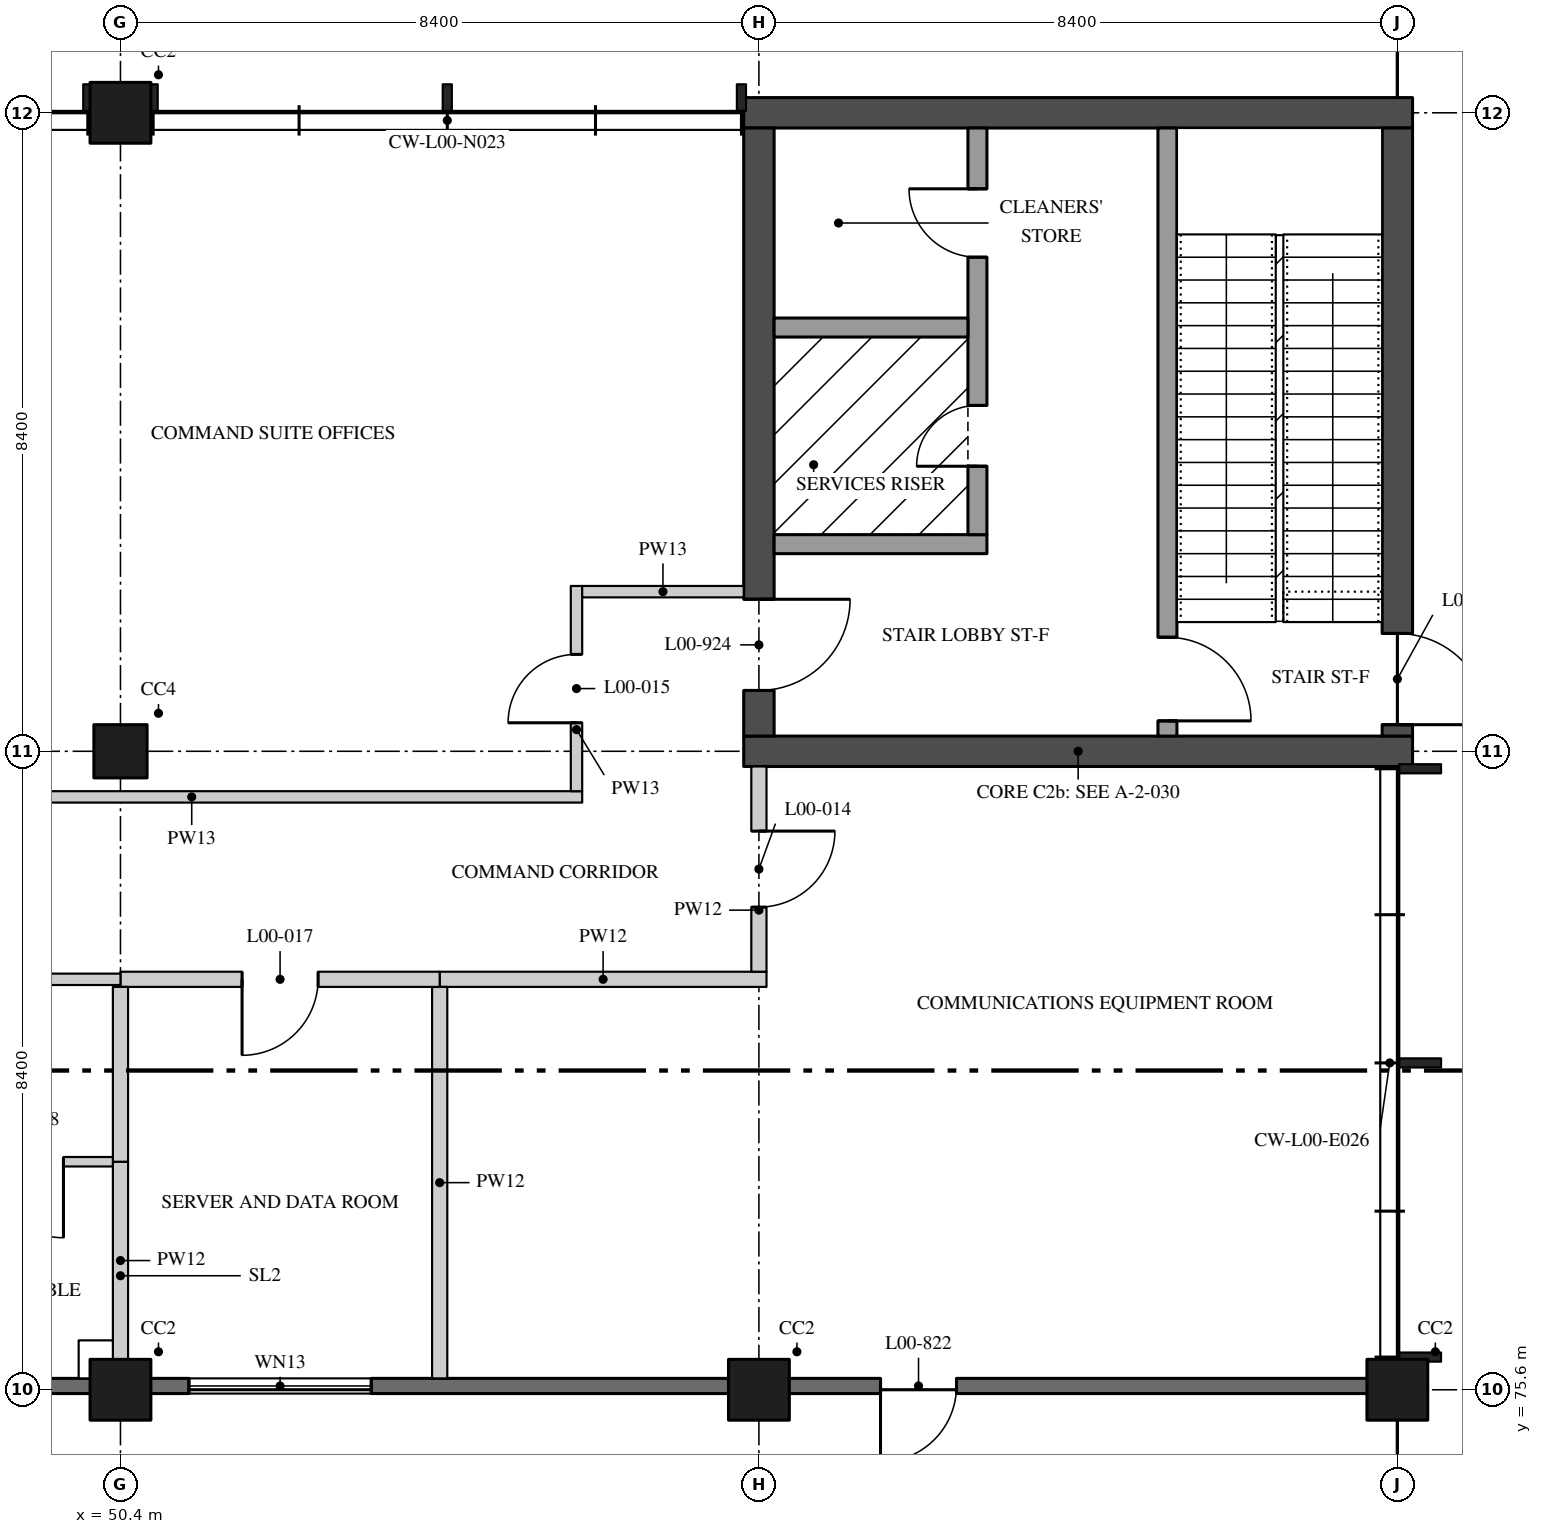
"""IFC4 building model, lengths in metres.
Left out: names, types, materials, properties, quantities, classifications, styles, units other than length and angle.
Written with IfcOpenShell. Run it as: python <this file> out.ifc"""

import sys

from ifc_helpers import new_model, si_unit, direction, frame, frame_2d, origin, origin_2d, place, context, subcontext, project, spatial, rectangle, extrude, element, fill, save


model = new_model("IFC4")
c1 = context("Model", 3, precision=1e-05, world=origin(), true_north=direction((0.0, 1.0)))
c2 = subcontext(c1, "Body", "Model", "MODEL_VIEW")
j1 = project(units=[si_unit("LENGTHUNIT", "METRE"), si_unit("PLANEANGLEUNIT", "RADIAN")], contexts=[c1])
p1 = place(None, origin())
s1 = spatial("IfcSite", under=j1, at=p1, CompositionType="ELEMENT")
p2 = place(p1, origin())
s2 = spatial("IfcBuilding", under=s1, at=p2, CompositionType="ELEMENT")
p3 = place(p2, origin())
s3 = spatial("IfcBuildingStorey", under=s2, at=p3, CompositionType="ELEMENT", Elevation=0.0)
p4 = place(p3, frame((50.4, 75.6, 0.0), z_axis=(0.0, 0.0, 1.0), x_axis=(1.0, 0.0, 0.0)))
e1 = element("IfcColumn", 1, at=p4, inside=s3, PredefinedType="COLUMN", context=c2, shape_type="SweptSolid", body=[
    extrude(rectangle(XDim=0.8, YDim=0.8, at=origin_2d()), origin(), (0.0, 0.0, 1.0), 5.05),
])
p5 = place(p3, frame((50.4, 84.0, 0.0), z_axis=(0.0, 0.0, 1.0), x_axis=(1.0, 0.0, 0.0)))
e2 = element("IfcColumn", 2, at=p5, inside=s3, PredefinedType="COLUMN", context=c2, shape_type="SweptSolid", body=[
    extrude(rectangle(XDim=0.7, YDim=0.7, at=origin_2d()), origin(), (0.0, 0.0, 1.0), 5.05),
])
for number, where, z_axis, x_axis in (
    (3, (50.4, 92.4, 0.0), (0.0, 0.0, 1.0), (1.0, 0.0, 0.0)),
    (4, (58.8, 75.6, 0.0), (0.0, 0.0, 1.0), (1.0, 0.0, 0.0)),
    (5, (67.2, 75.6, 0.0), (0.0, 0.0, 1.0), (1.0, 0.0, 0.0)),
):
    element("IfcColumn", number, at=place(p3, frame(where, z_axis=z_axis, x_axis=x_axis)), inside=s3, PredefinedType="COLUMN", context=c2, shape_type="SweptSolid", body=[
        extrude(rectangle(XDim=0.8, YDim=0.8, at=origin_2d()), origin(), (0.0, 0.0, 1.0), 5.05),
    ])
for number, where, z_axis, x_axis in (
    (6, (58.6, 84.0, 0.0), (0.0, 0.0, 1.0), (1.0, 0.0, 0.0)),
    (7, (58.6, 92.4, 0.0), (0.0, 0.0, 1.0), (1.0, 0.0, 0.0)),
):
    element("IfcWall", number, at=place(p3, frame(where, z_axis=z_axis, x_axis=x_axis)), inside=s3, PredefinedType="SHEAR", context=c2, shape_type="SweptSolid", body=[
        extrude(rectangle(XDim=8.8, YDim=0.4, at=frame_2d((4.4, 0.0))), origin(), (0.0, 0.0, 1.0), 5.05),
    ])
p6 = place(p3, frame((58.8, 84.2, 0.0), z_axis=(0.0, 0.0, 1.0), x_axis=(0.0, 1.0, 0.0)))
e8 = element("IfcWall", 8, at=p6, inside=s3, PredefinedType="SHEAR", context=c2, shape_type="SweptSolid", body=[
    extrude(rectangle(XDim=8.0, YDim=0.4, at=frame_2d((4.0, 0.0))), origin(), (0.0, 0.0, 1.0), 5.05),
])
p7 = place(p6, frame((0.6, 0.0, 0.0)))
e9 = element("IfcOpeningElement", 9, at=p7, cuts=e8, PredefinedType="OPENING", context=c2, shape_type="SweptSolid", body=[
    extrude(rectangle(XDim=1.2, YDim=2.1, at=frame_2d((0.6, 1.05))), frame((0.0, 0.21, 0.0), z_axis=(0.0, -1.0, 0.0), x_axis=(1.0, 0.0, 0.0)), (0.0, 0.0, 1.0), 0.42),
])
p8 = place(p3, frame((67.2, 84.2, 0.0), z_axis=(0.0, 0.0, 1.0), x_axis=(0.0, 1.0, 0.0)))
e10 = element("IfcWall", 10, at=p8, inside=s3, PredefinedType="SHEAR", context=c2, shape_type="SweptSolid", body=[
    extrude(rectangle(XDim=8.0, YDim=0.4, at=frame_2d((4.0, 0.0))), origin(), (0.0, 0.0, 1.0), 5.05),
])
p9 = place(p8, frame((0.15, 0.0, 0.0)))
e11 = element("IfcOpeningElement", 11, at=p9, cuts=e10, PredefinedType="OPENING", context=c2, shape_type="SweptSolid", body=[
    extrude(rectangle(XDim=1.2, YDim=2.1, at=frame_2d((0.6, 1.05))), frame((0.0, 0.21, 0.0), z_axis=(0.0, -1.0, 0.0), x_axis=(1.0, 0.0, 0.0)), (0.0, 0.0, 1.0), 0.42),
])
p10 = place(p3, frame((64.175, 84.2, 0.0), z_axis=(0.0, 0.0, 1.0), x_axis=(0.0, 1.0, 0.0)))
e12 = element("IfcWall", 12, at=p10, inside=s3, PredefinedType="SOLIDWALL", context=c2, shape_type="SweptSolid", body=[
    extrude(rectangle(XDim=8.0, YDim=0.25, at=frame_2d((4.0, 0.0))), origin(), (0.0, 0.0, 1.0), 5.05),
])
p11 = place(p10, frame((0.2, 0.0, 0.0)))
e13 = element("IfcOpeningElement", 13, at=p11, cuts=e12, PredefinedType="OPENING", context=c2, shape_type="SweptSolid", body=[
    extrude(rectangle(XDim=1.1, YDim=2.1, at=frame_2d((0.55, 1.05))), frame((0.0, 0.135, 0.0), z_axis=(0.0, -1.0, 0.0), x_axis=(1.0, 0.0, 0.0)), (0.0, 0.0, 1.0), 0.27),
])
p12 = place(p3, frame((61.8, 86.725, 0.0), z_axis=(0.0, 0.0, 1.0), x_axis=(-1.0, 0.0, 0.0)))
e14 = element("IfcWall", 14, at=p12, inside=s3, PredefinedType="SOLIDWALL", context=c2, shape_type="SweptSolid", body=[
    extrude(rectangle(XDim=2.8, YDim=0.25, at=frame_2d((1.4, 0.0))), origin(), (0.0, 0.0, 1.0), 5.05),
])
p13 = place(p3, frame((61.675, 86.85, 0.0), z_axis=(0.0, 0.0, 1.0), x_axis=(0.0, 1.0, 0.0)))
e15 = element("IfcWall", 15, at=p13, inside=s3, PredefinedType="SOLIDWALL", context=c2, shape_type="SweptSolid", body=[
    extrude(rectangle(XDim=5.35, YDim=0.25, at=frame_2d((2.675, 0.0))), origin(), (0.0, 0.0, 1.0), 5.05),
])
p14 = place(p13, frame((3.65, 0.0, 0.0)))
e16 = element("IfcOpeningElement", 16, at=p14, cuts=e15, PredefinedType="OPENING", context=c2, shape_type="SweptSolid", body=[
    extrude(rectangle(XDim=0.9, YDim=2.1, at=frame_2d((0.45, 1.05))), frame((0.0, 0.135, 0.0), z_axis=(0.0, -1.0, 0.0), x_axis=(1.0, 0.0, 0.0)), (0.0, 0.0, 1.0), 0.27),
])
p15 = place(p13, frame((0.9, 0.0, 0.0)))
e17 = element("IfcOpeningElement", 17, at=p15, cuts=e15, PredefinedType="OPENING", context=c2, shape_type="SweptSolid", body=[
    extrude(rectangle(XDim=0.8, YDim=2.1, at=frame_2d((0.4, 1.05))), frame((0.0, 0.135, 0.0), z_axis=(0.0, -1.0, 0.0), x_axis=(1.0, 0.0, 0.0)), (0.0, 0.0, 1.0), 0.27),
])
p16 = place(p3, frame((61.55, 89.575, 0.0), z_axis=(0.0, 0.0, 1.0), x_axis=(-1.0, 0.0, 0.0)))
e18 = element("IfcWall", 18, at=p16, inside=s3, PredefinedType="SOLIDWALL", context=c2, shape_type="SweptSolid", body=[
    extrude(rectangle(XDim=2.55, YDim=0.25, at=frame_2d((1.275, 0.0))), origin(), (0.0, 0.0, 1.0), 5.05),
])
p17 = place(p3, frame((54.6, 81.0, 0.0), z_axis=(0.0, 0.0, 1.0), x_axis=(1.0, 0.0, 0.0)))
e19 = element("IfcWall", 19, at=p17, inside=s3, PredefinedType="PARTITIONING", context=c2, shape_type="SweptSolid", body=[
    extrude(rectangle(XDim=4.3, YDim=0.2, at=frame_2d((2.15, 0.0))), origin(), (0.0, 0.0, 1.0), 5.05),
])
p18 = place(p3, frame((58.8, 81.1, 0.0), z_axis=(0.0, 0.0, 1.0), x_axis=(0.0, 1.0, 0.0)))
e20 = element("IfcWall", 20, at=p18, inside=s3, PredefinedType="PARTITIONING", context=c2, shape_type="SweptSolid", body=[
    extrude(rectangle(XDim=2.7, YDim=0.2, at=frame_2d((1.35, 0.0))), origin(), (0.0, 0.0, 1.0), 5.05),
])
p19 = place(p18, frame((0.85, 0.0, 0.0)))
e21 = element("IfcOpeningElement", 21, at=p19, cuts=e20, PredefinedType="OPENING", context=c2, shape_type="SweptSolid", body=[
    extrude(rectangle(XDim=1.0, YDim=2.1, at=frame_2d((0.5, 1.05))), frame((0.0, 0.11, 0.0), z_axis=(0.0, -1.0, 0.0), x_axis=(1.0, 0.0, 0.0)), (0.0, 0.0, 1.0), 0.22),
])
p20 = place(p3, frame((54.6, 75.75, 0.0), z_axis=(0.0, 0.0, 1.0), x_axis=(0.0, 1.0, 0.0)))
e22 = element("IfcWall", 22, at=p20, inside=s3, PredefinedType="PARTITIONING", context=c2, shape_type="SweptSolid", body=[
    extrude(rectangle(XDim=5.15, YDim=0.2, at=frame_2d((2.575, 0.0))), origin(), (0.0, 0.0, 1.0), 5.05),
])
p21 = place(p3, frame((46.2, 83.4, 0.0), z_axis=(0.0, 0.0, 1.0), x_axis=(1.0, 0.0, 0.0)))
e23 = element("IfcWall", 23, at=p21, inside=s3, PredefinedType="PARTITIONING", context=c2, shape_type="SweptSolid", body=[
    extrude(rectangle(XDim=10.275, YDim=0.15, at=frame_2d((5.138, 0.0))), origin(), (0.0, 0.0, 1.0), 5.05),
])
p22 = place(p3, frame((56.4, 83.475, 0.0), z_axis=(0.0, 0.0, 1.0), x_axis=(0.0, 1.0, 0.0)))
e24 = element("IfcWall", 24, at=p22, inside=s3, PredefinedType="PARTITIONING", context=c2, shape_type="SweptSolid", body=[
    extrude(rectangle(XDim=2.7, YDim=0.15, at=frame_2d((1.35, 0.0))), origin(), (0.0, 0.0, 1.0), 5.05),
])
p23 = place(p22, frame((0.9, 0.0, 0.0)))
e25 = element("IfcOpeningElement", 25, at=p23, cuts=e24, PredefinedType="OPENING", context=c2, shape_type="SweptSolid", body=[
    extrude(rectangle(XDim=0.9, YDim=2.1, at=frame_2d((0.45, 1.05))), frame((0.0, 0.085, 0.0), z_axis=(0.0, -1.0, 0.0), x_axis=(1.0, 0.0, 0.0)), (0.0, 0.0, 1.0), 0.17),
])
p24 = place(p3, frame((56.475, 86.1, 0.0), z_axis=(0.0, 0.0, 1.0), x_axis=(1.0, 0.0, 0.0)))
e26 = element("IfcWall", 26, at=p24, inside=s3, PredefinedType="PARTITIONING", context=c2, shape_type="SweptSolid", body=[
    extrude(rectangle(XDim=2.125, YDim=0.15, at=frame_2d((1.062, 0.0))), origin(), (0.0, 0.0, 1.0), 5.05),
])
p25 = place(p3, frame((50.4, 81.0, 0.0), z_axis=(0.0, 0.0, 1.0), x_axis=(1.0, 0.0, 0.0)))
e27 = element("IfcWall", 27, at=p25, inside=s3, PredefinedType="PARTITIONING", context=c2, shape_type="SweptSolid", body=[
    extrude(rectangle(XDim=4.2, YDim=0.2, at=frame_2d((2.1, 0.0))), origin(), (0.0, 0.0, 1.0), 5.05),
])
p26 = place(p25, frame((1.6, 0.0, 0.0)))
e28 = element("IfcOpeningElement", 28, at=p26, cuts=e27, PredefinedType="OPENING", context=c2, shape_type="SweptSolid", body=[
    extrude(rectangle(XDim=1.0, YDim=2.1, at=frame_2d((0.5, 1.05))), frame((0.0, 0.11, 0.0), z_axis=(0.0, -1.0, 0.0), x_axis=(1.0, 0.0, 0.0)), (0.0, 0.0, 1.0), 0.22),
])
p27 = place(p3, frame((42.2, 81.0, 0.0), z_axis=(0.0, 0.0, 1.0), x_axis=(1.0, 0.0, 0.0)))
e29 = element("IfcWall", 29, at=p27, inside=s3, PredefinedType="PARTITIONING", context=c2, shape_type="SweptSolid", body=[
    extrude(rectangle(XDim=8.2, YDim=0.15, at=frame_2d((4.1, 0.0))), origin(), (0.0, 0.0, 1.0), 5.05),
])
p28 = place(p27, frame((2.35, 0.0, 0.0)))
e30 = element("IfcOpeningElement", 30, at=p28, cuts=e29, PredefinedType="OPENING", context=c2, shape_type="SweptSolid", body=[
    extrude(rectangle(XDim=0.9, YDim=2.1, at=frame_2d((0.45, 1.05))), frame((0.0, 0.085, 0.0), z_axis=(0.0, -1.0, 0.0), x_axis=(1.0, 0.0, 0.0)), (0.0, 0.0, 1.0), 0.17),
])
p29 = place(p3, frame((50.4, 76.0, 0.0), z_axis=(0.0, 0.0, 1.0), x_axis=(0.0, 1.0, 0.0)))
e31 = element("IfcWall", 31, at=p29, inside=s3, PredefinedType="PARTITIONING", context=c2, shape_type="SweptSolid", body=[
    extrude(rectangle(XDim=2.6, YDim=0.2, at=frame_2d((1.3, 0.0))), origin(), (0.0, 0.0, 1.0), 5.05),
])
p30 = place(p3, frame((50.4, 78.6, 0.0), z_axis=(0.0, 0.0, 1.0), x_axis=(0.0, 1.0, 0.0)))
e32 = element("IfcWall", 32, at=p30, inside=s3, PredefinedType="PARTITIONING", context=c2, shape_type="SweptSolid", body=[
    extrude(rectangle(XDim=2.3, YDim=0.2, at=frame_2d((1.15, 0.0))), origin(), (0.0, 0.0, 1.0), 5.05),
])
p31 = place(p3, frame((48.0, 78.6, 0.0), z_axis=(0.0, 0.0, 1.0), x_axis=(1.0, 0.0, 0.0)))
e33 = element("IfcWall", 33, at=p31, inside=s3, PredefinedType="PARTITIONING", context=c2, shape_type="SweptSolid", body=[
    extrude(rectangle(XDim=2.3, YDim=0.125, at=frame_2d((1.15, 0.0))), origin(), (0.0, 0.0, 1.0), 5.05),
])
p32 = place(p31, frame((0.65, 0.0, 0.0)))
e34 = element("IfcOpeningElement", 34, at=p32, cuts=e33, PredefinedType="OPENING", context=c2, shape_type="SweptSolid", body=[
    extrude(rectangle(XDim=1.0, YDim=2.1, at=frame_2d((0.5, 1.05))), frame((0.0, 0.073, 0.0), z_axis=(0.0, -1.0, 0.0), x_axis=(1.0, 0.0, 0.0)), (0.0, 0.0, 1.0), 0.145),
])
p33 = place(p3, frame((42.2, 75.65, 0.0), z_axis=(0.0, 0.0, 1.0), x_axis=(1.0, 0.0, 0.0)))
e35 = element("IfcWall", 35, at=p33, inside=s3, PredefinedType="SOLIDWALL", context=c2, shape_type="SweptSolid", body=[
    extrude(rectangle(XDim=7.82, YDim=0.2, at=frame_2d((3.91, 0.0))), origin(), (0.0, 0.0, 1.0), 5.05),
])
p34 = place(p3, frame((50.78, 75.65, 0.0), z_axis=(0.0, 0.0, 1.0), x_axis=(1.0, 0.0, 0.0)))
e36 = element("IfcWall", 36, at=p34, inside=s3, PredefinedType="SOLIDWALL", context=c2, shape_type="SweptSolid", body=[
    extrude(rectangle(XDim=7.64, YDim=0.2, at=frame_2d((3.82, 0.0))), origin(), (0.0, 0.0, 1.0), 5.05),
])
p35 = place(p34, frame((0.52, 0.0, 0.9)))
e37 = element("IfcOpeningElement", 37, at=p35, cuts=e36, PredefinedType="OPENING", context=c2, shape_type="SweptSolid", body=[
    extrude(rectangle(XDim=2.4, YDim=2.85, at=frame_2d((1.2, 1.425))), frame((0.0, 0.11, 0.0), z_axis=(0.0, -1.0, 0.0), x_axis=(1.0, 0.0, 0.0)), (0.0, 0.0, 1.0), 0.22),
])
p36 = place(p3, frame((59.18, 75.65, 0.0), z_axis=(0.0, 0.0, 1.0), x_axis=(1.0, 0.0, 0.0)))
e38 = element("IfcWall", 38, at=p36, inside=s3, PredefinedType="SOLIDWALL", context=c2, shape_type="SweptSolid", body=[
    extrude(rectangle(XDim=7.64, YDim=0.2, at=frame_2d((3.82, 0.0))), origin(), (0.0, 0.0, 1.0), 5.05),
])
p37 = place(p36, frame((1.22, 0.0, 0.0)))
e39 = element("IfcOpeningElement", 39, at=p37, cuts=e38, PredefinedType="OPENING", context=c2, shape_type="SweptSolid", body=[
    extrude(rectangle(XDim=1.0, YDim=2.4, at=frame_2d((0.5, 1.2))), frame((0.0, 0.11, 0.0), z_axis=(0.0, -1.0, 0.0), x_axis=(1.0, 0.0, 0.0)), (0.0, 0.0, 1.0), 0.22),
])
p38 = place(p14, origin())
e40 = element("IfcDoor", 40, at=p38, inside=s3, OperationType="SINGLE_SWING_LEFT", PredefinedType="DOOR", context=c2, shape_type="SweptSolid", body=[
    extrude(rectangle(XDim=0.9, YDim=2.1, at=frame_2d((0.45, 1.05))), frame((0.0, 0.035, 0.0), z_axis=(0.0, -1.0, 0.0), x_axis=(1.0, 0.0, 0.0)), (0.0, 0.0, 1.0), 0.07),
])
fill(e16, e40)
p39 = place(p7, frame((1.2, 0.0, 0.0), z_axis=(0.0, 0.0, 1.0), x_axis=(-1.0, 0.0, 0.0)))
e41 = element("IfcDoor", 41, at=p39, inside=s3, OperationType="SINGLE_SWING_RIGHT", PredefinedType="DOOR", context=c2, shape_type="SweptSolid", body=[
    extrude(rectangle(XDim=1.2, YDim=2.1, at=frame_2d((0.6, 1.05))), frame((0.0, 0.035, 0.0), z_axis=(0.0, -1.0, 0.0), x_axis=(1.0, 0.0, 0.0)), (0.0, 0.0, 1.0), 0.07),
])
fill(e9, e41)
p40 = place(p15, origin())
e42 = element("IfcDoor", 42, at=p40, inside=s3, OperationType="SINGLE_SWING_RIGHT", PredefinedType="DOOR", context=c2, shape_type="SweptSolid", body=[
    extrude(rectangle(XDim=0.8, YDim=2.1, at=frame_2d((0.4, 1.05))), frame((0.0, 0.035, 0.0), z_axis=(0.0, -1.0, 0.0), x_axis=(1.0, 0.0, 0.0)), (0.0, 0.0, 1.0), 0.07),
])
fill(e17, e42)
p41 = place(p11, frame((1.1, 0.0, 0.0), z_axis=(0.0, 0.0, 1.0), x_axis=(-1.0, 0.0, 0.0)))
e43 = element("IfcDoor", 43, at=p41, inside=s3, OperationType="SINGLE_SWING_LEFT", PredefinedType="DOOR", context=c2, shape_type="SweptSolid", body=[
    extrude(rectangle(XDim=1.1, YDim=2.1, at=frame_2d((0.55, 1.05))), frame((0.0, 0.035, 0.0), z_axis=(0.0, -1.0, 0.0), x_axis=(1.0, 0.0, 0.0)), (0.0, 0.0, 1.0), 0.07),
])
fill(e13, e43)
p42 = place(p9, frame((1.2, 0.0, 0.0), z_axis=(0.0, 0.0, 1.0), x_axis=(-1.0, 0.0, 0.0)))
e44 = element("IfcDoor", 44, at=p42, inside=s3, OperationType="SINGLE_SWING_LEFT", PredefinedType="DOOR", context=c2, shape_type="SweptSolid", body=[
    extrude(rectangle(XDim=1.2, YDim=2.1, at=frame_2d((0.6, 1.05))), frame((0.0, 0.035, 0.0), z_axis=(0.0, -1.0, 0.0), x_axis=(1.0, 0.0, 0.0)), (0.0, 0.0, 1.0), 0.07),
])
fill(e11, e44)
p43 = place(p19, frame((1.0, 0.0, 0.0), z_axis=(0.0, 0.0, 1.0), x_axis=(-1.0, 0.0, 0.0)))
e45 = element("IfcDoor", 45, at=p43, inside=s3, OperationType="SINGLE_SWING_RIGHT", PredefinedType="DOOR", context=c2, shape_type="SweptSolid", body=[
    extrude(rectangle(XDim=1.0, YDim=2.1, at=frame_2d((0.5, 1.05))), frame((0.0, 0.03, 0.0), z_axis=(0.0, -1.0, 0.0), x_axis=(1.0, 0.0, 0.0)), (0.0, 0.0, 1.0), 0.06),
])
fill(e21, e45)
p44 = place(p23, origin())
e46 = element("IfcDoor", 46, at=p44, inside=s3, OperationType="SINGLE_SWING_RIGHT", PredefinedType="DOOR", context=c2, shape_type="SweptSolid", body=[
    extrude(rectangle(XDim=0.9, YDim=2.1, at=frame_2d((0.45, 1.05))), frame((0.0, 0.025, 0.0), z_axis=(0.0, -1.0, 0.0), x_axis=(1.0, 0.0, 0.0)), (0.0, 0.0, 1.0), 0.05),
])
fill(e25, e46)
p45 = place(p26, frame((1.0, 0.0, 0.0), z_axis=(0.0, 0.0, 1.0), x_axis=(-1.0, 0.0, 0.0)))
e47 = element("IfcDoor", 47, at=p45, inside=s3, OperationType="SINGLE_SWING_LEFT", PredefinedType="DOOR", context=c2, shape_type="SweptSolid", body=[
    extrude(rectangle(XDim=1.0, YDim=2.1, at=frame_2d((0.5, 1.05))), frame((0.0, 0.03, 0.0), z_axis=(0.0, -1.0, 0.0), x_axis=(1.0, 0.0, 0.0)), (0.0, 0.0, 1.0), 0.06),
])
fill(e28, e47)
p46 = place(p32, frame((1.0, 0.0, 0.0), z_axis=(0.0, 0.0, 1.0), x_axis=(-1.0, 0.0, 0.0)))
e48 = element("IfcDoor", 48, at=p46, inside=s3, OperationType="SINGLE_SWING_RIGHT", PredefinedType="DOOR", context=c2, shape_type="SweptSolid", body=[
    extrude(rectangle(XDim=1.0, YDim=2.1, at=frame_2d((0.5, 1.05))), frame((0.0, 0.02, 0.0), z_axis=(0.0, -1.0, 0.0), x_axis=(1.0, 0.0, 0.0)), (0.0, 0.0, 1.0), 0.04),
])
fill(e34, e48)
p47 = place(p35, origin())
e49 = element("IfcWindow", 49, at=p47, inside=s3, PartitioningType="SINGLE_PANEL", PredefinedType="WINDOW", context=c2, shape_type="SweptSolid", body=[
    extrude(rectangle(XDim=2.4, YDim=2.85, at=frame_2d((1.2, 1.425))), frame((0.0, 0.05, 0.0), z_axis=(0.0, -1.0, 0.0), x_axis=(1.0, 0.0, 0.0)), (0.0, 0.0, 1.0), 0.1),
])
fill(e37, e49)
p48 = place(p37, frame((1.0, 0.0, 0.0), z_axis=(0.0, 0.0, 1.0), x_axis=(-1.0, 0.0, 0.0)))
e50 = element("IfcDoor", 50, at=p48, inside=s3, OperationType="SINGLE_SWING_LEFT", PredefinedType="DOOR", context=c2, shape_type="SweptSolid", body=[
    extrude(rectangle(XDim=1.0, YDim=2.4, at=frame_2d((0.5, 1.2))), frame((0.0, 0.025, 0.0), z_axis=(0.0, -1.0, 0.0), x_axis=(1.0, 0.0, 0.0)), (0.0, 0.0, 1.0), 0.05),
])
fill(e39, e50)
save(model, sys.argv[1])
